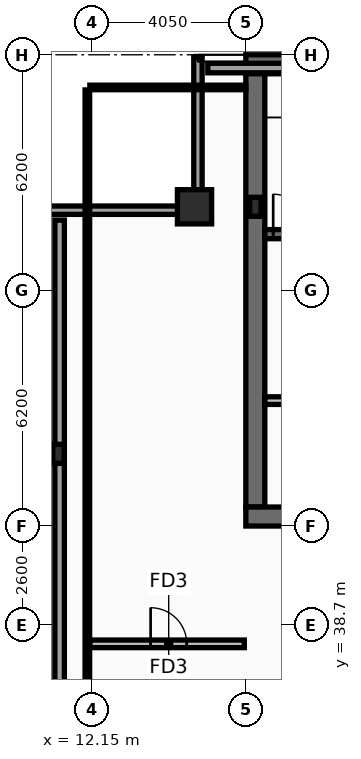
"""IFC4 building model, lengths in metres.
Left out: names, types, materials, properties, quantities, classifications, styles, units other than length and angle.
Written with IfcOpenShell. Run it as: python <this file> out.ifc"""

import sys

from ifc_helpers import new_model, si_unit, direction, frame, frame_2d, origin, origin_2d, place, context, subcontext, project, spatial, rectangle, hollow_rectangle, i_section, extrude, element, fill, save


model = new_model("IFC4")
c1 = context("Model", 3, precision=1e-05, world=origin(), true_north=direction((0.0, 1.0)))
c2 = subcontext(c1, "Body", "Model", "MODEL_VIEW")
j1 = project(units=[si_unit("LENGTHUNIT", "METRE"), si_unit("PLANEANGLEUNIT", "RADIAN")], contexts=[c1])
p1 = place(None, origin())
s1 = spatial("IfcSite", under=j1, at=p1, CompositionType="ELEMENT")
p2 = place(p1, origin())
s2 = spatial("IfcBuilding", under=s1, at=p2, CompositionType="ELEMENT")
p3 = place(p2, frame((0.0, 0.0, 378.6)))
s3 = spatial("IfcBuildingStorey", under=s2, at=p3, CompositionType="ELEMENT", Elevation=378.6)
p4 = place(p3, frame((16.2, 53.45, 0.0), z_axis=(0.0, 0.0, 1.0), x_axis=(1.0, 0.0, 0.0)))
e1 = element("IfcWall", 1, at=p4, inside=s3, PredefinedType="SHEAR", context=c2, shape_type="SweptSolid", body=[
    extrude(rectangle(XDim=40.5, YDim=0.5, at=frame_2d((20.25, 0.0))), origin(), (0.0, 0.0, 1.0), 4.0),
])
p5 = place(p3, frame((16.45, 41.8, 0.0), z_axis=(0.0, 0.0, 1.0), x_axis=(0.0, 1.0, 0.0)))
e2 = element("IfcWall", 2, at=p5, inside=s3, PredefinedType="SHEAR", context=c2, shape_type="SweptSolid", body=[
    extrude(rectangle(XDim=11.4, YDim=0.5, at=frame_2d((5.7, 0.0))), origin(), (0.0, 0.0, 1.0), 4.0),
])
p6 = place(p3, frame((18.65, 41.55, 0.0), z_axis=(0.0, 0.0, 1.0), x_axis=(-1.0, 0.0, 0.0)))
e3 = element("IfcWall", 3, at=p6, inside=s3, PredefinedType="SHEAR", context=c2, shape_type="SweptSolid", body=[
    extrude(rectangle(XDim=2.45, YDim=0.5, at=frame_2d((1.225, 0.0))), origin(), (0.0, 0.0, 1.0), 4.0),
])
p7 = place(p3, frame((16.7, 48.98, 0.0), z_axis=(0.0, 0.0, 1.0), x_axis=(1.0, 0.0, 0.0)))
e4 = element("IfcWall", 4, at=p7, inside=s3, PredefinedType="SHEAR", context=c2, shape_type="SweptSolid", body=[
    extrude(rectangle(XDim=7.52, YDim=0.24, at=frame_2d((3.76, 0.0))), origin(), (0.0, 0.0, 1.0), 4.0),
])
p8 = place(p7, frame((0.22, 0.0, 0.0)))
e5 = element("IfcOpeningElement", 5, at=p8, cuts=e4, PredefinedType="OPENING", context=c2, shape_type="SweptSolid", body=[
    extrude(rectangle(XDim=1.05, YDim=2.15, at=frame_2d((0.525, 1.075))), frame((0.0, 0.13, 0.0), z_axis=(0.0, -1.0, 0.0), x_axis=(1.0, 0.0, 0.0)), (0.0, 0.0, 1.0), 0.26),
])
p9 = place(p3, frame((14.85, 49.7, 0.0), z_axis=(0.0, 0.0, 1.0), x_axis=(1.0, 0.0, 0.0)))
e6 = element("IfcColumn", 6, at=p9, inside=s3, PredefinedType="COLUMN", context=c2, shape_type="SweptSolid", body=[
    extrude(hollow_rectangle(XDim=0.9, YDim=0.9, WallThickness=0.05, at=origin_2d()), origin(), (0.0, 0.0, 1.0), 5.36),
])
for number, where, z_axis, x_axis in (
    (7, (11.27, 43.2, 0.0), (0.0, 0.0, 1.0), (1.0, 0.0, 0.0)),
    (8, (16.45, 49.7, 0.0), (0.0, 0.0, 1.0), (1.0, 0.0, 0.0)),
):
    element("IfcColumn", number, at=place(p3, frame(where, z_axis=z_axis, x_axis=x_axis)), inside=s3, PredefinedType="COLUMN", context=c2, shape_type="SweptSolid", body=[
        extrude(i_section(OverallWidth=0.3, OverallDepth=0.5, WebThickness=0.014, FlangeThickness=0.028, at=origin_2d()), origin(), (0.0, 0.0, 1.0), 5.36),
    ])
p10 = place(p3, frame((10.92, 49.61, 0.0), z_axis=(0.0, 0.0, 1.0), x_axis=(1.0, 0.0, 0.0)))
e9 = element("IfcWall", 9, at=p10, inside=s3, PredefinedType="SOLIDWALL", context=c2, shape_type="SweptSolid", body=[
    extrude(rectangle(XDim=4.13, YDim=0.22, at=frame_2d((2.065, 0.0))), origin(), (0.0, 0.0, 1.0), 3.62),
])
p11 = place(p3, frame((14.94, 49.72, 0.0), z_axis=(0.0, 0.0, 1.0), x_axis=(0.0, 1.0, 0.0)))
e10 = element("IfcWall", 10, at=p11, inside=s3, PredefinedType="SOLIDWALL", context=c2, shape_type="SweptSolid", body=[
    extrude(rectangle(XDim=3.91, YDim=0.22, at=frame_2d((1.955, 0.0))), origin(), (0.0, 0.0, 1.0), 3.62),
])
p12 = place(p3, frame((57.7, 53.35, 5.58), z_axis=(0.0, 0.0, 1.0), x_axis=(-1.0, 0.0, 0.0)))
e11 = element("IfcWall", 11, at=p12, inside=s3, PredefinedType="PARAPET", context=c2, shape_type="SweptSolid", body=[
    extrude(rectangle(XDim=42.5, YDim=0.25, at=frame_2d((21.25, 0.0))), origin(), (0.0, 0.0, 1.0), 0.9),
])
p13 = place(p3, frame((11.3, 49.35, 5.58), z_axis=(0.0, 0.0, 1.0), x_axis=(0.0, -1.0, 0.0)))
e12 = element("IfcWall", 12, at=p13, inside=s3, PredefinedType="PARAPET", context=c2, shape_type="SweptSolid", body=[
    extrude(rectangle(XDim=35.3, YDim=0.25, at=frame_2d((17.65, 0.0))), origin(), (0.0, 0.0, 1.0), 0.9),
])
p14 = place(p3, frame((16.7, 44.6, 0.0), z_axis=(0.0, 0.0, 1.0), x_axis=(1.0, 0.0, 0.0)))
e13 = element("IfcWall", 13, at=p14, inside=s3, PredefinedType="PARTITIONING", context=c2, shape_type="SweptSolid", body=[
    extrude(rectangle(XDim=4.3, YDim=0.2, at=frame_2d((2.15, 0.0))), origin(), (0.0, 0.0, 1.0), 4.18),
])
p15 = place(p14, frame((1.25, 0.0, 0.0)))
e14 = element("IfcOpeningElement", 14, at=p15, cuts=e13, PredefinedType="OPENING", context=c2, shape_type="SweptSolid", body=[
    extrude(rectangle(XDim=1.05, YDim=2.15, at=frame_2d((0.525, 1.075))), frame((0.0, 0.11, 0.0), z_axis=(0.0, -1.0, 0.0), x_axis=(1.0, 0.0, 0.0)), (0.0, 0.0, 1.0), 0.22),
])
p16 = place(p3, frame((12.095, 38.2, 0.0), z_axis=(0.0, 0.0, 1.0), x_axis=(1.0, 0.0, 0.0)))
e15 = element("IfcWall", 15, at=p16, inside=s3, PredefinedType="PARTITIONING", context=c2, shape_type="SweptSolid", body=[
    extrude(rectangle(XDim=4.065, YDim=0.2, at=frame_2d((2.032, 0.0))), origin(), (0.0, 0.0, 1.0), 4.18),
])
p17 = place(p16, frame((1.6, 0.0, 0.0)))
e16 = element("IfcOpeningElement", 16, at=p17, cuts=e15, PredefinedType="OPENING", context=c2, shape_type="SweptSolid", body=[
    extrude(rectangle(XDim=0.95, YDim=2.1, at=frame_2d((0.475, 1.05))), frame((0.0, 0.11, 0.0), z_axis=(0.0, -1.0, 0.0), x_axis=(1.0, 0.0, 0.0)), (0.0, 0.0, 1.0), 0.22),
])
p18 = place(p3, frame((12.03, 10.665, 0.0), z_axis=(0.0, 0.0, 1.0), x_axis=(0.0, 1.0, 0.0)))
e17 = element("IfcWall", 17, at=p18, inside=s3, PredefinedType="PARTITIONING", context=c2, shape_type="SweptSolid", body=[
    extrude(rectangle(XDim=42.11, YDim=0.12, at=frame_2d((21.055, 0.0))), origin(), (0.0, 0.0, 1.0), 4.18),
])
p19 = place(p3, frame((12.095, 52.84, 0.0), z_axis=(0.0, 0.0, 1.0), x_axis=(1.0, 0.0, 0.0)))
e18 = element("IfcWall", 18, at=p19, inside=s3, PredefinedType="PARTITIONING", context=c2, shape_type="SweptSolid", body=[
    extrude(rectangle(XDim=4.105, YDim=0.12, at=frame_2d((2.052, 0.0))), origin(), (0.0, 0.0, 1.0), 4.18),
])
p20 = place(p8, origin())
e19 = element("IfcDoor", 19, at=p20, inside=s3, OperationType="SINGLE_SWING_LEFT", PredefinedType="DOOR", context=c2, shape_type="SweptSolid", body=[
    extrude(rectangle(XDim=1.05, YDim=2.15, at=frame_2d((0.525, 1.075))), frame((0.0, 0.025, 0.0), z_axis=(0.0, -1.0, 0.0), x_axis=(1.0, 0.0, 0.0)), (0.0, 0.0, 1.0), 0.05),
])
fill(e5, e19)
p21 = place(p17, origin())
e20 = element("IfcDoor", 20, at=p21, inside=s3, OperationType="SINGLE_SWING_LEFT", PredefinedType="DOOR", context=c2, shape_type="SweptSolid", body=[
    extrude(rectangle(XDim=0.95, YDim=2.1, at=frame_2d((0.475, 1.05))), frame((0.0, 0.025, 0.0), z_axis=(0.0, -1.0, 0.0), x_axis=(1.0, 0.0, 0.0)), (0.0, 0.0, 1.0), 0.05),
])
fill(e16, e20)
save(model, sys.argv[1])
